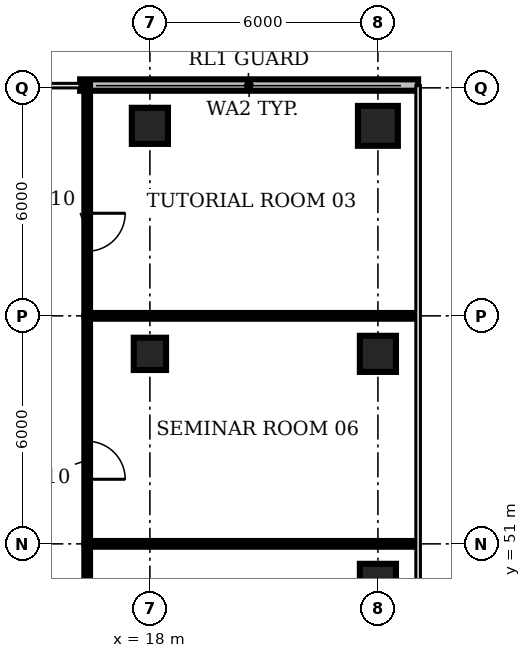
"""IFC4 building model, lengths in metres.
Left out: names, types, materials, properties, quantities, classifications, styles, units other than length and angle.
Written with IfcOpenShell. Run it as: python <this file> out.ifc"""

import sys

from ifc_helpers import new_model, si_unit, direction, frame, frame_2d, origin, origin_2d, place, context, subcontext, project, spatial, rectangle, circle, extrude, element, fill, save


model = new_model("IFC4")
c1 = context("Model", 3, precision=1e-05, world=origin(), true_north=direction((0.0, 1.0)))
c2 = subcontext(c1, "Body", "Model", "MODEL_VIEW")
j1 = project(units=[si_unit("LENGTHUNIT", "METRE"), si_unit("PLANEANGLEUNIT", "RADIAN")], contexts=[c1])
p1 = place(None, origin())
s1 = spatial("IfcSite", under=j1, at=p1, CompositionType="ELEMENT")
p2 = place(p1, origin())
s2 = spatial("IfcBuilding", under=s1, at=p2, CompositionType="ELEMENT")
p3 = place(p2, frame((0.0, 0.0, 66.8)))
s3 = spatial("IfcBuildingStorey", under=s2, at=p3, CompositionType="ELEMENT", Elevation=66.8)
p4 = place(p3, frame((18.0, 56.0, 0.0), z_axis=(0.0, 0.0, 1.0), x_axis=(1.0, 0.0, 0.0)))
e1 = element("IfcColumn", 1, at=p4, inside=s3, PredefinedType="COLUMN", context=c2, shape_type="SweptSolid", body=[
    extrude(rectangle(XDim=0.85, YDim=0.85, at=origin_2d()), origin(), (0.0, 0.0, 1.0), 3.85),
])
for number, where, z_axis, x_axis in (
    (2, (18.0, 62.0, 0.0), (0.0, 0.0, 1.0), (1.0, 0.0, 0.0)),
    (3, (24.0, 50.0, 0.0), (0.0, 0.0, 1.0), (1.0, 0.0, 0.0)),
    (4, (24.0, 56.0, 0.0), (0.0, 0.0, 1.0), (1.0, 0.0, 0.0)),
):
    element("IfcColumn", number, at=place(p3, frame(where, z_axis=z_axis, x_axis=x_axis)), inside=s3, PredefinedType="COLUMN", context=c2, shape_type="SweptSolid", body=[
        extrude(rectangle(XDim=0.95, YDim=0.95, at=origin_2d()), origin(), (0.0, 0.0, 1.0), 3.85),
    ])
p5 = place(p3, frame((24.0, 62.0, 0.0), z_axis=(0.0, 0.0, 1.0), x_axis=(1.0, 0.0, 0.0)))
e5 = element("IfcColumn", 5, at=p5, inside=s3, PredefinedType="COLUMN", context=c2, shape_type="SweptSolid", body=[
    extrude(circle(Radius=0.525, at=origin_2d()), origin(), (0.0, 0.0, 1.0), 3.85),
])
p6 = place(p3, frame((25.058, 63.074, 0.0), z_axis=(0.0, 0.0, 1.0), x_axis=(-1.0, 0.0, 0.0)))
e6 = element("IfcWall", 6, at=p6, inside=s3, PredefinedType="SOLIDWALL", context=c2, shape_type="SweptSolid", body=[
    extrude(rectangle(XDim=8.894, YDim=0.3, at=frame_2d((4.447, 0.0))), origin(), (0.0, 0.0, 1.0), 3.85),
])
p7 = place(p3, frame((16.35, 51.0, 0.0), z_axis=(0.0, 0.0, 1.0), x_axis=(0.0, -1.0, 0.0)))
e7 = element("IfcWall", 7, at=p7, inside=s3, PredefinedType="PARTITIONING", context=c2, shape_type="SweptSolid", body=[
    extrude(rectangle(XDim=6.0, YDim=0.15, at=frame_2d((3.0, 0.0))), origin(), (0.0, 0.0, 1.0), 2.83),
])
p8 = place(p7, frame((2.4, 0.0, 0.0)))
e8 = element("IfcOpeningElement", 8, at=p8, cuts=e7, PredefinedType="OPENING", context=c2, shape_type="SweptSolid", body=[
    extrude(rectangle(XDim=1.0, YDim=2.1, at=frame_2d((0.5, 1.05))), frame((0.0, 0.085, 0.0), z_axis=(0.0, -1.0, 0.0), x_axis=(1.0, 0.0, 0.0)), (0.0, 0.0, 1.0), 0.17),
])
p9 = place(p3, frame((16.35, 51.0, 0.0), z_axis=(0.0, 0.0, 1.0), x_axis=(1.0, 0.0, 0.0)))
e9 = element("IfcWall", 9, at=p9, inside=s3, PredefinedType="PARTITIONING", context=c2, shape_type="SweptSolid", body=[
    extrude(rectangle(XDim=8.66, YDim=0.15, at=frame_2d((4.33, 0.0))), origin(), (0.0, 0.0, 1.0), 2.83),
])
p10 = place(p3, frame((16.35, 57.0, 0.0), z_axis=(0.0, 0.0, 1.0), x_axis=(0.0, -1.0, 0.0)))
e10 = element("IfcWall", 10, at=p10, inside=s3, PredefinedType="PARTITIONING", context=c2, shape_type="SweptSolid", body=[
    extrude(rectangle(XDim=6.0, YDim=0.15, at=frame_2d((3.0, 0.0))), origin(), (0.0, 0.0, 1.0), 2.83),
])
p11 = place(p10, frame((3.3, 0.0, 0.0)))
e11 = element("IfcOpeningElement", 11, at=p11, cuts=e10, PredefinedType="OPENING", context=c2, shape_type="SweptSolid", body=[
    extrude(rectangle(XDim=1.0, YDim=2.1, at=frame_2d((0.5, 1.05))), frame((0.0, 0.085, 0.0), z_axis=(0.0, -1.0, 0.0), x_axis=(1.0, 0.0, 0.0)), (0.0, 0.0, 1.0), 0.17),
])
p12 = place(p3, frame((16.35, 57.0, 0.0), z_axis=(0.0, 0.0, 1.0), x_axis=(1.0, 0.0, 0.0)))
e12 = element("IfcWall", 12, at=p12, inside=s3, PredefinedType="PARTITIONING", context=c2, shape_type="SweptSolid", body=[
    extrude(rectangle(XDim=8.643, YDim=0.15, at=frame_2d((4.321, 0.0))), origin(), (0.0, 0.0, 1.0), 2.83),
])
p13 = place(p3, frame((16.35, 63.118, 0.0), z_axis=(0.0, 0.0, 1.0), x_axis=(0.0, -1.0, 0.0)))
e13 = element("IfcWall", 13, at=p13, inside=s3, PredefinedType="PARTITIONING", context=c2, shape_type="SweptSolid", body=[
    extrude(rectangle(XDim=6.118, YDim=0.15, at=frame_2d((3.059, 0.0))), origin(), (0.0, 0.0, 1.0), 2.83),
])
p14 = place(p13, frame((3.418, 0.0, 0.0)))
e14 = element("IfcOpeningElement", 14, at=p14, cuts=e13, PredefinedType="OPENING", context=c2, shape_type="SweptSolid", body=[
    extrude(rectangle(XDim=1.0, YDim=2.1, at=frame_2d((0.5, 1.05))), frame((0.0, 0.085, 0.0), z_axis=(0.0, -1.0, 0.0), x_axis=(1.0, 0.0, 0.0)), (0.0, 0.0, 1.0), 0.17),
])
p15 = place(p11, origin())
e15 = element("IfcDoor", 15, at=p15, inside=s3, OperationType="SINGLE_SWING_RIGHT", PredefinedType="DOOR", context=c2, shape_type="SweptSolid", body=[
    extrude(rectangle(XDim=1.0, YDim=2.1, at=frame_2d((0.5, 1.05))), frame((0.0, 0.025, 0.0), z_axis=(0.0, -1.0, 0.0), x_axis=(1.0, 0.0, 0.0)), (0.0, 0.0, 1.0), 0.05),
])
fill(e11, e15)
p16 = place(p14, origin())
e16 = element("IfcDoor", 16, at=p16, inside=s3, OperationType="SINGLE_SWING_LEFT", PredefinedType="DOOR", context=c2, shape_type="SweptSolid", body=[
    extrude(rectangle(XDim=1.0, YDim=2.1, at=frame_2d((0.5, 1.05))), frame((0.0, 0.025, 0.0), z_axis=(0.0, -1.0, 0.0), x_axis=(1.0, 0.0, 0.0)), (0.0, 0.0, 1.0), 0.05),
])
fill(e14, e16)
save(model, sys.argv[1])
